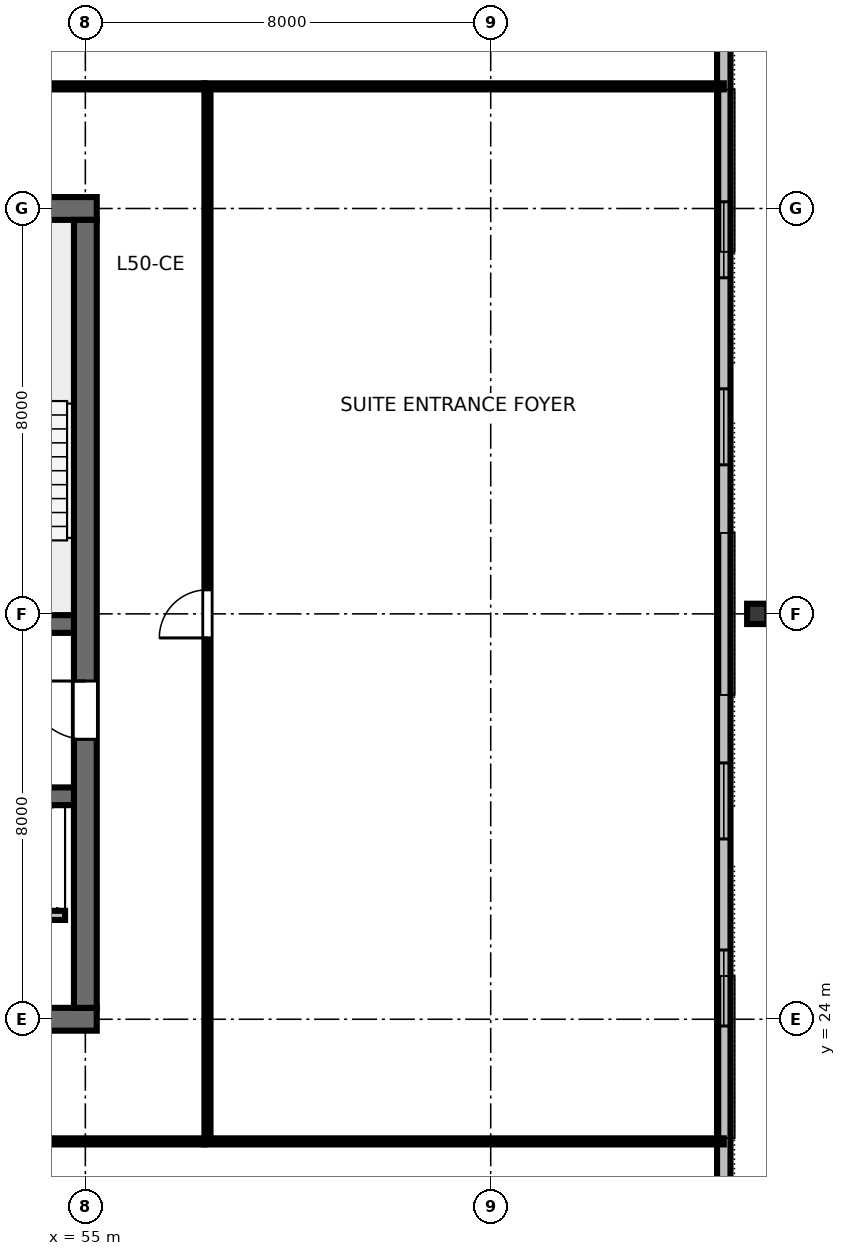
"""IFC4 building model, lengths in metres.
Left out: names, types, materials, properties, quantities, classifications, styles, units other than length and angle.
Written with IfcOpenShell. Run it as: python <this file> out.ifc"""

import sys

from ifc_helpers import new_model, si_unit, direction, frame, frame_2d, origin, origin_2d, place, context, subcontext, project, spatial, rectangle, i_section, extrude, element, fill, save


model = new_model("IFC4")
c1 = context("Model", 3, precision=1e-05, world=origin(), true_north=direction((0.0, 1.0)))
c2 = subcontext(c1, "Body", "Model", "MODEL_VIEW")
j1 = project(units=[si_unit("LENGTHUNIT", "METRE"), si_unit("PLANEANGLEUNIT", "RADIAN")], contexts=[c1])
p1 = place(None, origin())
s1 = spatial("IfcSite", under=j1, at=p1, CompositionType="ELEMENT")
p2 = place(p1, origin())
s2 = spatial("IfcBuilding", under=s1, at=p2, CompositionType="ELEMENT")
p3 = place(p2, frame((0.0, 0.0, 191.4)))
s3 = spatial("IfcBuildingStorey", under=s2, at=p3, CompositionType="ELEMENT", Elevation=191.4)
p4 = place(p3, frame((36.775, 24.0, 0.0), z_axis=(0.0, 0.0, 1.0), x_axis=(1.0, 0.0, 0.0)))
e1 = element("IfcWall", 1, at=p4, inside=s3, PredefinedType="SHEAR", context=c2, shape_type="SweptSolid", body=[
    extrude(rectangle(XDim=18.45, YDim=0.45, at=frame_2d((9.225, 0.0))), origin(), (0.0, 0.0, 1.0), 3.36),
])
p5 = place(p4, frame((13.425, 0.0, 0.0)))
e2 = element("IfcOpeningElement", 2, at=p5, cuts=e1, PredefinedType="OPENING", context=c2, shape_type="SweptSolid", body=[
    extrude(rectangle(XDim=1.6, YDim=2.15, at=frame_2d((0.8, 1.075))), frame((0.0, 0.235, 0.0), z_axis=(0.0, -1.0, 0.0), x_axis=(1.0, 0.0, 0.0)), (0.0, 0.0, 1.0), 0.47),
])
p6 = place(p3, frame((36.775, 40.0, 0.0), z_axis=(0.0, 0.0, 1.0), x_axis=(1.0, 0.0, 0.0)))
e3 = element("IfcWall", 3, at=p6, inside=s3, PredefinedType="SHEAR", context=c2, shape_type="SweptSolid", body=[
    extrude(rectangle(XDim=18.45, YDim=0.45, at=frame_2d((9.225, 0.0))), origin(), (0.0, 0.0, 1.0), 3.36),
])
p7 = place(p6, frame((8.725, 0.0, 0.0)))
e4 = element("IfcOpeningElement", 4, at=p7, cuts=e3, PredefinedType="OPENING", context=c2, shape_type="SweptSolid", body=[
    extrude(rectangle(XDim=1.0, YDim=2.15, at=frame_2d((0.5, 1.075))), frame((0.0, 0.235, 0.0), z_axis=(0.0, -1.0, 0.0), x_axis=(1.0, 0.0, 0.0)), (0.0, 0.0, 1.0), 0.47),
])
p8 = place(p3, frame((55.0, 24.225, 0.0), z_axis=(0.0, 0.0, 1.0), x_axis=(0.0, 1.0, 0.0)))
e5 = element("IfcWall", 5, at=p8, inside=s3, PredefinedType="SHEAR", context=c2, shape_type="SweptSolid", body=[
    extrude(rectangle(XDim=15.55, YDim=0.45, at=frame_2d((7.775, 0.0))), origin(), (0.0, 0.0, 1.0), 3.36),
])
p9 = place(p8, frame((5.3, 0.0, 0.0)))
e6 = element("IfcOpeningElement", 6, at=p9, cuts=e5, PredefinedType="OPENING", context=c2, shape_type="SweptSolid", body=[
    extrude(rectangle(XDim=1.15, YDim=2.15, at=frame_2d((0.575, 1.075))), frame((0.0, 0.235, 0.0), z_axis=(0.0, -1.0, 0.0), x_axis=(1.0, 0.0, 0.0)), (0.0, 0.0, 1.0), 0.47),
])
p10 = place(p3, frame((37.225, 31.8, 0.0), z_axis=(0.0, 0.0, 1.0), x_axis=(1.0, 0.0, 0.0)))
e7 = element("IfcWall", 7, at=p10, inside=s3, PredefinedType="SHEAR", context=c2, shape_type="SweptSolid", body=[
    extrude(rectangle(XDim=17.55, YDim=0.35, at=frame_2d((8.775, 0.0))), origin(), (0.0, 0.0, 1.0), 3.36),
])
p11 = place(p10, frame((0.825, 0.0, 0.0)))
e8 = element("IfcOpeningElement", 8, at=p11, cuts=e7, PredefinedType="OPENING", context=c2, shape_type="SweptSolid", body=[
    extrude(rectangle(XDim=1.1, YDim=2.15, at=frame_2d((0.55, 1.075))), frame((0.0, 0.185, 0.0), z_axis=(0.0, -1.0, 0.0), x_axis=(1.0, 0.0, 0.0)), (0.0, 0.0, 1.0), 0.37),
])
p12 = place(p10, frame((14.725, 0.0, 0.0)))
e9 = element("IfcOpeningElement", 9, at=p12, cuts=e7, PredefinedType="OPENING", context=c2, shape_type="SweptSolid", body=[
    extrude(rectangle(XDim=1.1, YDim=2.15, at=frame_2d((0.55, 1.075))), frame((0.0, 0.185, 0.0), z_axis=(0.0, -1.0, 0.0), x_axis=(1.0, 0.0, 0.0)), (0.0, 0.0, 1.0), 0.37),
])
p13 = place(p3, frame((37.225, 28.4, 0.0), z_axis=(0.0, 0.0, 1.0), x_axis=(1.0, 0.0, 0.0)))
e10 = element("IfcWall", 10, at=p13, inside=s3, PredefinedType="SHEAR", context=c2, shape_type="SweptSolid", body=[
    extrude(rectangle(XDim=17.55, YDim=0.35, at=frame_2d((8.775, 0.0))), origin(), (0.0, 0.0, 1.0), 3.36),
])
p14 = place(p3, frame((68.26, 32.0, 0.0), z_axis=(0.0, 0.0, 1.0), x_axis=(0.0, 1.0, 0.0)))
e11 = element("IfcColumn", 11, at=p14, inside=s3, PredefinedType="COLUMN", context=c2, shape_type="SweptSolid", body=[
    extrude(i_section(OverallWidth=0.401, OverallDepth=0.399, WebThickness=0.025, FlangeThickness=0.04, FilletRadius=0.025, at=origin_2d()), origin(), (0.0, 0.0, 1.0), 3.373),
])
p15 = place(p3, frame((67.6, 17.98, 0.0), z_axis=(0.0, 0.0, 1.0), x_axis=(0.0, 1.0, 0.0)))
e12 = element("IfcWall", 12, at=p15, inside=s3, PredefinedType="STANDARD", context=c2, shape_type="SweptSolid", body=[
    extrude(rectangle(XDim=28.04, YDim=0.265, at=frame_2d((14.02, 0.0))), origin(), (0.0, 0.0, 1.0), 3.375),
])
p16 = place(p15, frame((5.887, 0.0, 0.85)))
e13 = element("IfcOpeningElement", 13, at=p16, cuts=e12, PredefinedType="OPENING", context=c2, shape_type="SweptSolid", body=[
    extrude(rectangle(XDim=1.5, YDim=1.85, at=frame_2d((0.75, 0.925))), frame((0.0, 0.142, 0.0), z_axis=(0.0, -1.0, 0.0), x_axis=(1.0, 0.0, 0.0)), (0.0, 0.0, 1.0), 0.285),
])
p17 = place(p15, frame((9.579, 0.0, 0.85)))
e14 = element("IfcOpeningElement", 14, at=p17, cuts=e12, PredefinedType="OPENING", context=c2, shape_type="SweptSolid", body=[
    extrude(rectangle(XDim=1.5, YDim=1.85, at=frame_2d((0.75, 0.925))), frame((0.0, 0.142, 0.0), z_axis=(0.0, -1.0, 0.0), x_axis=(1.0, 0.0, 0.0)), (0.0, 0.0, 1.0), 0.285),
])
p18 = place(p15, frame((16.961, 0.0, 0.85)))
e15 = element("IfcOpeningElement", 15, at=p18, cuts=e12, PredefinedType="OPENING", context=c2, shape_type="SweptSolid", body=[
    extrude(rectangle(XDim=1.5, YDim=1.85, at=frame_2d((0.75, 0.925))), frame((0.0, 0.142, 0.0), z_axis=(0.0, -1.0, 0.0), x_axis=(1.0, 0.0, 0.0)), (0.0, 0.0, 1.0), 0.285),
])
p19 = place(p15, frame((20.653, 0.0, 0.85)))
e16 = element("IfcOpeningElement", 16, at=p19, cuts=e12, PredefinedType="OPENING", context=c2, shape_type="SweptSolid", body=[
    extrude(rectangle(XDim=1.5, YDim=1.85, at=frame_2d((0.75, 0.925))), frame((0.0, 0.142, 0.0), z_axis=(0.0, -1.0, 0.0), x_axis=(1.0, 0.0, 0.0)), (0.0, 0.0, 1.0), 0.285),
])
p20 = place(p3, frame((47.6, 26.05, 0.0), z_axis=(0.0, 0.0, 1.0), x_axis=(1.0, 0.0, 0.0)))
e17 = element("IfcWall", 17, at=p20, inside=s3, PredefinedType="PARTITIONING", context=c2, shape_type="SweptSolid", body=[
    extrude(rectangle(XDim=7.0, YDim=0.18, at=frame_2d((3.5, 0.0))), origin(), (0.0, 0.0, 1.0), 3.375),
])
p21 = place(p20, frame((1.2, 0.0, 0.0)))
e18 = element("IfcOpeningElement", 18, at=p21, cuts=e17, PredefinedType="OPENING", context=c2, shape_type="SweptSolid", body=[
    extrude(rectangle(XDim=1.05, YDim=2.15, at=frame_2d((0.525, 1.075))), frame((0.0, 0.1, 0.0), z_axis=(0.0, -1.0, 0.0), x_axis=(1.0, 0.0, 0.0)), (0.0, 0.0, 1.0), 0.2),
])
p22 = place(p20, frame((3.4, 0.0, 0.0)))
e19 = element("IfcOpeningElement", 19, at=p22, cuts=e17, PredefinedType="OPENING", context=c2, shape_type="SweptSolid", body=[
    extrude(rectangle(XDim=1.05, YDim=2.15, at=frame_2d((0.525, 1.075))), frame((0.0, 0.1, 0.0), z_axis=(0.0, -1.0, 0.0), x_axis=(1.0, 0.0, 0.0)), (0.0, 0.0, 1.0), 0.2),
])
p23 = place(p3, frame((47.02, 21.59, 0.0), z_axis=(0.0, 0.0, 1.0), x_axis=(1.0, 0.0, 0.0)))
e20 = element("IfcWall", 20, at=p23, inside=s3, PredefinedType="PARTITIONING", context=c2, shape_type="SweptSolid", body=[
    extrude(rectangle(XDim=10.33, YDim=0.12, at=frame_2d((5.165, 0.0))), origin(), (0.0, 0.0, 1.0), 2.655),
])
p24 = place(p23, frame((4.924, 0.0, 0.0)))
e21 = element("IfcOpeningElement", 21, at=p24, cuts=e20, PredefinedType="OPENING", context=c2, shape_type="SweptSolid", body=[
    extrude(rectangle(XDim=0.95, YDim=2.15, at=frame_2d((0.475, 1.075))), frame((0.0, 0.07, 0.0), z_axis=(0.0, -1.0, 0.0), x_axis=(1.0, 0.0, 0.0)), (0.0, 0.0, 1.0), 0.14),
])
p25 = place(p3, frame((47.02, 42.41, 0.0), z_axis=(0.0, 0.0, 1.0), x_axis=(1.0, 0.0, 0.0)))
e22 = element("IfcWall", 22, at=p25, inside=s3, PredefinedType="PARTITIONING", context=c2, shape_type="SweptSolid", body=[
    extrude(rectangle(XDim=10.33, YDim=0.12, at=frame_2d((5.165, 0.0))), origin(), (0.0, 0.0, 1.0), 2.655),
])
p26 = place(p25, frame((4.986, 0.0, 0.0)))
e23 = element("IfcOpeningElement", 23, at=p26, cuts=e22, PredefinedType="OPENING", context=c2, shape_type="SweptSolid", body=[
    extrude(rectangle(XDim=0.95, YDim=2.15, at=frame_2d((0.475, 1.075))), frame((0.0, 0.07, 0.0), z_axis=(0.0, -1.0, 0.0), x_axis=(1.0, 0.0, 0.0)), (0.0, 0.0, 1.0), 0.14),
])
p27 = place(p3, frame((57.41, 21.65, 0.0), z_axis=(0.0, 0.0, 1.0), x_axis=(0.0, 1.0, 0.0)))
e24 = element("IfcWall", 24, at=p27, inside=s3, PredefinedType="PARTITIONING", context=c2, shape_type="SweptSolid", body=[
    extrude(rectangle(XDim=20.7, YDim=0.12, at=frame_2d((10.35, 0.0))), origin(), (0.0, 0.0, 1.0), 2.655),
])
p28 = place(p27, frame((9.875, 0.0, 0.0)))
e25 = element("IfcOpeningElement", 25, at=p28, cuts=e24, PredefinedType="OPENING", context=c2, shape_type="SweptSolid", body=[
    extrude(rectangle(XDim=0.95, YDim=2.15, at=frame_2d((0.475, 1.075))), frame((0.0, 0.07, 0.0), z_axis=(0.0, -1.0, 0.0), x_axis=(1.0, 0.0, 0.0)), (0.0, 0.0, 1.0), 0.14),
])
for number, where, z_axis, x_axis in (
    (26, (57.35, 21.59, 0.0), (0.0, 0.0, 1.0), (1.0, 0.0, 0.0)),
    (27, (57.35, 42.41, 0.0), (0.0, 0.0, 1.0), (1.0, 0.0, 0.0)),
):
    element("IfcWall", number, at=place(p3, frame(where, z_axis=z_axis, x_axis=x_axis)), inside=s3, PredefinedType="PARTITIONING", context=c2, shape_type="SweptSolid", body=[
        extrude(rectangle(XDim=10.25, YDim=0.12, at=frame_2d((5.125, 0.0))), origin(), (0.0, 0.0, 1.0), 2.655),
    ])
p29 = place(p16, origin())
e28 = element("IfcWindow", 28, at=p29, inside=s3, PartitioningType="SINGLE_PANEL", PredefinedType="WINDOW", context=c2, shape_type="SweptSolid", body=[
    extrude(rectangle(XDim=1.5, YDim=1.85, at=frame_2d((0.75, 0.925))), frame((0.0, 0.03, 0.0), z_axis=(0.0, -1.0, 0.0), x_axis=(1.0, 0.0, 0.0)), (0.0, 0.0, 1.0), 0.06),
])
fill(e13, e28)
p30 = place(p17, origin())
e29 = element("IfcWindow", 29, at=p30, inside=s3, PartitioningType="SINGLE_PANEL", PredefinedType="WINDOW", context=c2, shape_type="SweptSolid", body=[
    extrude(rectangle(XDim=1.5, YDim=1.85, at=frame_2d((0.75, 0.925))), frame((0.0, 0.03, 0.0), z_axis=(0.0, -1.0, 0.0), x_axis=(1.0, 0.0, 0.0)), (0.0, 0.0, 1.0), 0.06),
])
fill(e14, e29)
p31 = place(p18, origin())
e30 = element("IfcWindow", 30, at=p31, inside=s3, PartitioningType="SINGLE_PANEL", PredefinedType="WINDOW", context=c2, shape_type="SweptSolid", body=[
    extrude(rectangle(XDim=1.5, YDim=1.85, at=frame_2d((0.75, 0.925))), frame((0.0, 0.03, 0.0), z_axis=(0.0, -1.0, 0.0), x_axis=(1.0, 0.0, 0.0)), (0.0, 0.0, 1.0), 0.06),
])
fill(e15, e30)
p32 = place(p19, origin())
e31 = element("IfcWindow", 31, at=p32, inside=s3, PartitioningType="SINGLE_PANEL", PredefinedType="WINDOW", context=c2, shape_type="SweptSolid", body=[
    extrude(rectangle(XDim=1.5, YDim=1.85, at=frame_2d((0.75, 0.925))), frame((0.0, 0.03, 0.0), z_axis=(0.0, -1.0, 0.0), x_axis=(1.0, 0.0, 0.0)), (0.0, 0.0, 1.0), 0.06),
])
fill(e16, e31)
p33 = place(p9, origin())
e32 = element("IfcDoor", 32, at=p33, inside=s3, OperationType="SINGLE_SWING_RIGHT", PredefinedType="DOOR", context=c2, shape_type="SweptSolid", body=[
    extrude(rectangle(XDim=1.15, YDim=2.15, at=frame_2d((0.575, 1.075))), frame((0.0, 0.025, 0.0), z_axis=(0.0, -1.0, 0.0), x_axis=(1.0, 0.0, 0.0)), (0.0, 0.0, 1.0), 0.05),
])
fill(e6, e32)
p34 = place(p28, origin())
e33 = element("IfcDoor", 33, at=p34, inside=s3, OperationType="SINGLE_SWING_LEFT", PredefinedType="DOOR", context=c2, shape_type="SweptSolid", body=[
    extrude(rectangle(XDim=0.95, YDim=2.15, at=frame_2d((0.475, 1.075))), frame((0.0, 0.025, 0.0), z_axis=(0.0, -1.0, 0.0), x_axis=(1.0, 0.0, 0.0)), (0.0, 0.0, 1.0), 0.05),
])
fill(e25, e33)
save(model, sys.argv[1])
